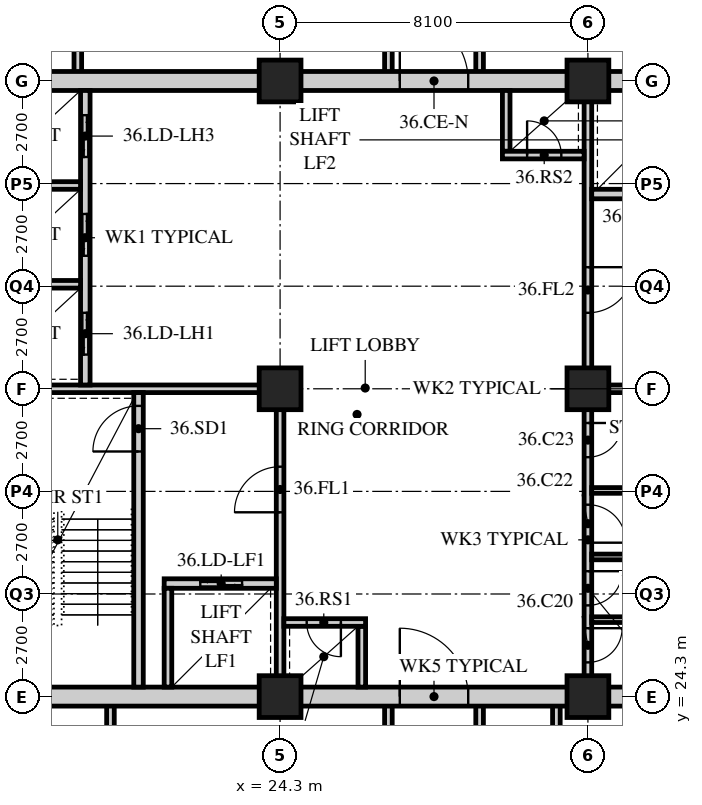
"""IFC4 building model, lengths in metres.
Left out: names, types, materials, properties, quantities, classifications, styles, units other than length and angle.
Written with IfcOpenShell. Run it as: python <this file> out.ifc"""

import sys

from ifc_helpers import new_model, si_unit, direction, frame, frame_2d, origin, origin_2d, place, context, subcontext, project, spatial, rectangle, hollow_rectangle, extrude, element, fill, save


model = new_model("IFC4")
c1 = context("Model", 3, precision=1e-05, world=origin(), true_north=direction((0.0, 1.0)))
c2 = subcontext(c1, "Body", "Model", "MODEL_VIEW")
j1 = project(units=[si_unit("LENGTHUNIT", "METRE"), si_unit("PLANEANGLEUNIT", "RADIAN")], contexts=[c1])
p1 = place(None, origin())
s1 = spatial("IfcSite", under=j1, at=p1, CompositionType="ELEMENT")
p2 = place(p1, origin())
s2 = spatial("IfcBuilding", under=s1, at=p2, CompositionType="ELEMENT")
p3 = place(p2, frame((0.0, 0.0, 140.8)))
s3 = spatial("IfcBuildingStorey", under=s2, at=p3, CompositionType="ELEMENT", Elevation=140.8)
for number, where, z_axis, x_axis in (
    (1, (24.3, 24.3, 0.0), (0.0, 0.0, 1.0), (1.0, 0.0, 0.0)),
    (2, (24.3, 32.4, 0.0), (0.0, 0.0, 1.0), (1.0, 0.0, 0.0)),
    (3, (24.3, 40.5, 0.0), (0.0, 0.0, 1.0), (1.0, 0.0, 0.0)),
    (4, (32.4, 24.3, 0.0), (0.0, 0.0, 1.0), (1.0, 0.0, 0.0)),
    (5, (32.4, 32.4, 0.0), (0.0, 0.0, 1.0), (1.0, 0.0, 0.0)),
    (6, (32.4, 40.5, 0.0), (0.0, 0.0, 1.0), (1.0, 0.0, 0.0)),
):
    element("IfcColumn", number, at=place(p3, frame(where, z_axis=z_axis, x_axis=x_axis)), inside=s3, PredefinedType="COLUMN", context=c2, shape_type="SweptSolid", body=[
        extrude(hollow_rectangle(XDim=1.1, YDim=1.1, WallThickness=0.1, at=origin_2d()), origin(), (0.0, 0.0, 1.0), 3.4),
    ])
for number, where, z_axis, x_axis in (
    (7, (19.836, 19.35, 0.0), (0.0, 0.0, 1.0), (0.0, 1.0, 0.0)),
    (8, (31.57, 19.35, 0.0), (0.0, 0.0, 1.0), (0.0, 1.0, 0.0)),
    (9, (27.15, 19.35, 0.0), (0.0, 0.0, 1.0), (0.0, 1.0, 0.0)),
    (10, (29.55, 19.35, 0.0), (0.0, 0.0, 1.0), (0.0, 1.0, 0.0)),
):
    element("IfcWall", number, at=place(p3, frame(where, z_axis=z_axis, x_axis=x_axis)), inside=s3, PredefinedType="SOLIDWALL", context=c2, shape_type="SweptSolid", body=[
        extrude(rectangle(XDim=4.95, YDim=0.2, at=frame_2d((2.475, 0.0))), origin(), (0.0, 0.0, 1.0), 3.19),
    ])
for number, where, z_axis, x_axis in (
    (11, (18.978, 44.1, 0.0), (0.0, 0.0, 1.0), (0.0, -1.0, 0.0)),
    (12, (27.15, 40.5, 0.0), (0.0, 0.0, 1.0), (0.0, 1.0, 0.0)),
    (13, (29.55, 40.5, 0.0), (0.0, 0.0, 1.0), (0.0, 1.0, 0.0)),
):
    element("IfcWall", number, at=place(p3, frame(where, z_axis=z_axis, x_axis=x_axis)), inside=s3, PredefinedType="SOLIDWALL", context=c2, shape_type="SweptSolid", body=[
        extrude(rectangle(XDim=3.6, YDim=0.2, at=frame_2d((1.8, 0.0))), origin(), (0.0, 0.0, 1.0), 3.19),
    ])
p4 = place(p3, frame((15.95, 24.3, 0.0), z_axis=(0.0, 0.0, 1.0), x_axis=(1.0, 0.0, 0.0)))
e14 = element("IfcWall", 14, at=p4, inside=s3, PredefinedType="SOLIDWALL", context=c2, shape_type="SweptSolid", body=[
    extrude(rectangle(XDim=24.8, YDim=0.5, at=frame_2d((12.4, 0.0))), origin(), (0.0, 0.0, 1.0), 2.54),
])
p5 = place(p4, frame((11.5, 0.0, 0.0)))
e15 = element("IfcOpeningElement", 15, at=p5, cuts=e14, PredefinedType="OPENING", context=c2, shape_type="SweptSolid", body=[
    extrude(rectangle(XDim=1.8, YDim=2.4, at=frame_2d((0.9, 1.2))), frame((0.0, 0.26, 0.0), z_axis=(0.0, -1.0, 0.0), x_axis=(1.0, 0.0, 0.0)), (0.0, 0.0, 1.0), 0.52),
])
p6 = place(p3, frame((15.95, 40.5, 0.0), z_axis=(0.0, 0.0, 1.0), x_axis=(1.0, 0.0, 0.0)))
e16 = element("IfcWall", 16, at=p6, inside=s3, PredefinedType="SOLIDWALL", context=c2, shape_type="SweptSolid", body=[
    extrude(rectangle(XDim=24.8, YDim=0.5, at=frame_2d((12.4, 0.0))), origin(), (0.0, 0.0, 1.0), 2.54),
])
p7 = place(p6, frame((11.5, 0.0, 0.0)))
e17 = element("IfcOpeningElement", 17, at=p7, cuts=e16, PredefinedType="OPENING", context=c2, shape_type="SweptSolid", body=[
    extrude(rectangle(XDim=1.8, YDim=2.4, at=frame_2d((0.9, 1.2))), frame((0.0, 0.26, 0.0), z_axis=(0.0, -1.0, 0.0), x_axis=(1.0, 0.0, 0.0)), (0.0, 0.0, 1.0), 0.52),
])
p8 = place(p3, frame((16.45, 32.4, 0.0), z_axis=(0.0, 0.0, 1.0), x_axis=(1.0, 0.0, 0.0)))
e18 = element("IfcWall", 18, at=p8, inside=s3, PredefinedType="SOLIDWALL", context=c2, shape_type="SweptSolid", body=[
    extrude(rectangle(XDim=7.95, YDim=0.2, at=frame_2d((3.975, 0.0))), origin(), (0.0, 0.0, 1.0), 2.578),
])
p9 = place(p3, frame((24.3, 24.55, 0.0), z_axis=(0.0, 0.0, 1.0), x_axis=(0.0, 1.0, 0.0)))
e19 = element("IfcWall", 19, at=p9, inside=s3, PredefinedType="SOLIDWALL", context=c2, shape_type="SweptSolid", body=[
    extrude(rectangle(XDim=7.75, YDim=0.2, at=frame_2d((3.875, 0.0))), origin(), (0.0, 0.0, 1.0), 2.578),
])
p10 = place(p9, frame((4.6, 0.0, 0.0)))
e20 = element("IfcOpeningElement", 20, at=p10, cuts=e19, PredefinedType="OPENING", context=c2, shape_type="SweptSolid", body=[
    extrude(rectangle(XDim=1.2, YDim=2.1, at=frame_2d((0.6, 1.05))), frame((0.0, 0.11, 0.0), z_axis=(0.0, -1.0, 0.0), x_axis=(1.0, 0.0, 0.0)), (0.0, 0.0, 1.0), 0.22),
])
p11 = place(p3, frame((20.575, 24.55, 0.0), z_axis=(0.0, 0.0, 1.0), x_axis=(0.0, 1.0, 0.0)))
e21 = element("IfcWall", 21, at=p11, inside=s3, PredefinedType="SOLIDWALL", context=c2, shape_type="SweptSolid", body=[
    extrude(rectangle(XDim=7.75, YDim=0.25, at=frame_2d((3.875, 0.0))), origin(), (0.0, 0.0, 1.0), 3.19),
])
p12 = place(p11, frame((6.2, 0.0, 0.0)))
e22 = element("IfcOpeningElement", 22, at=p12, cuts=e21, PredefinedType="OPENING", context=c2, shape_type="SweptSolid", body=[
    extrude(rectangle(XDim=1.2, YDim=2.1, at=frame_2d((0.6, 1.05))), frame((0.0, 0.135, 0.0), z_axis=(0.0, -1.0, 0.0), x_axis=(1.0, 0.0, 0.0)), (0.0, 0.0, 1.0), 0.27),
])
p13 = place(p3, frame((21.25, 27.275, 0.0), z_axis=(0.0, 0.0, 1.0), x_axis=(1.0, 0.0, 0.0)))
e23 = element("IfcWall", 23, at=p13, inside=s3, PredefinedType="SOLIDWALL", context=c2, shape_type="SweptSolid", body=[
    extrude(rectangle(XDim=2.95, YDim=0.25, at=frame_2d((1.475, 0.0))), origin(), (0.0, 0.0, 1.0), 3.19),
])
p14 = place(p13, frame((0.95, 0.0, 0.0)))
e24 = element("IfcOpeningElement", 24, at=p14, cuts=e23, PredefinedType="OPENING", context=c2, shape_type="SweptSolid", body=[
    extrude(rectangle(XDim=1.1, YDim=2.4, at=frame_2d((0.55, 1.2))), frame((0.0, 0.135, 0.0), z_axis=(0.0, -1.0, 0.0), x_axis=(1.0, 0.0, 0.0)), (0.0, 0.0, 1.0), 0.27),
])
p15 = place(p3, frame((21.35, 24.55, 0.0), z_axis=(0.0, 0.0, 1.0), x_axis=(0.0, 1.0, 0.0)))
e25 = element("IfcWall", 25, at=p15, inside=s3, PredefinedType="SOLIDWALL", context=c2, shape_type="SweptSolid", body=[
    extrude(rectangle(XDim=2.6, YDim=0.2, at=frame_2d((1.3, 0.0))), origin(), (0.0, 0.0, 1.0), 3.19),
])
p16 = place(p3, frame((19.175, 32.5, 0.0), z_axis=(0.0, 0.0, 1.0), x_axis=(0.0, 1.0, 0.0)))
e26 = element("IfcWall", 26, at=p16, inside=s3, PredefinedType="SOLIDWALL", context=c2, shape_type="SweptSolid", body=[
    extrude(rectangle(XDim=7.75, YDim=0.25, at=frame_2d((3.875, 0.0))), origin(), (0.0, 0.0, 1.0), 3.19),
])
p17 = place(p16, frame((0.8, 0.0, 0.0)))
e27 = element("IfcOpeningElement", 27, at=p17, cuts=e26, PredefinedType="OPENING", context=c2, shape_type="SweptSolid", body=[
    extrude(rectangle(XDim=1.1, YDim=2.4, at=frame_2d((0.55, 1.2))), frame((0.0, 0.135, 0.0), z_axis=(0.0, -1.0, 0.0), x_axis=(1.0, 0.0, 0.0)), (0.0, 0.0, 1.0), 0.27),
])
p18 = place(p16, frame((3.4, 0.0, 0.0)))
e28 = element("IfcOpeningElement", 28, at=p18, cuts=e26, PredefinedType="OPENING", context=c2, shape_type="SweptSolid", body=[
    extrude(rectangle(XDim=1.1, YDim=2.4, at=frame_2d((0.55, 1.2))), frame((0.0, 0.135, 0.0), z_axis=(0.0, -1.0, 0.0), x_axis=(1.0, 0.0, 0.0)), (0.0, 0.0, 1.0), 0.27),
])
p19 = place(p16, frame((6.0, 0.0, 0.0)))
e29 = element("IfcOpeningElement", 29, at=p19, cuts=e26, PredefinedType="OPENING", context=c2, shape_type="SweptSolid", body=[
    extrude(rectangle(XDim=1.1, YDim=2.4, at=frame_2d((0.55, 1.2))), frame((0.0, 0.135, 0.0), z_axis=(0.0, -1.0, 0.0), x_axis=(1.0, 0.0, 0.0)), (0.0, 0.0, 1.0), 0.27),
])
for number, where, z_axis, x_axis in (
    (30, (16.45, 35.15, 0.0), (0.0, 0.0, 1.0), (1.0, 0.0, 0.0)),
    (31, (16.45, 37.75, 0.0), (0.0, 0.0, 1.0), (1.0, 0.0, 0.0)),
):
    element("IfcWall", number, at=place(p3, frame(where, z_axis=z_axis, x_axis=x_axis)), inside=s3, PredefinedType="SOLIDWALL", context=c2, shape_type="SweptSolid", body=[
        extrude(rectangle(XDim=2.6, YDim=0.2, at=frame_2d((1.3, 0.0))), origin(), (0.0, 0.0, 1.0), 3.19),
    ])
p20 = place(p3, frame((26.45, 24.55, 0.0), z_axis=(0.0, 0.0, 1.0), x_axis=(0.0, 1.0, 0.0)))
e32 = element("IfcWall", 32, at=p20, inside=s3, PredefinedType="SOLIDWALL", context=c2, shape_type="SweptSolid", body=[
    extrude(rectangle(XDim=1.6, YDim=0.2, at=frame_2d((0.8, 0.0))), origin(), (0.0, 0.0, 1.0), 3.19),
])
p21 = place(p3, frame((24.4, 26.25, 0.0), z_axis=(0.0, 0.0, 1.0), x_axis=(1.0, 0.0, 0.0)))
e33 = element("IfcWall", 33, at=p21, inside=s3, PredefinedType="SOLIDWALL", context=c2, shape_type="SweptSolid", body=[
    extrude(rectangle(XDim=2.15, YDim=0.2, at=frame_2d((1.075, 0.0))), origin(), (0.0, 0.0, 1.0), 3.19),
])
p22 = place(p21, frame((0.6, 0.0, 0.0)))
e34 = element("IfcOpeningElement", 34, at=p22, cuts=e33, PredefinedType="OPENING", context=c2, shape_type="SweptSolid", body=[
    extrude(rectangle(XDim=0.9, YDim=2.1, at=frame_2d((0.45, 1.05))), frame((0.0, 0.11, 0.0), z_axis=(0.0, -1.0, 0.0), x_axis=(1.0, 0.0, 0.0)), (0.0, 0.0, 1.0), 0.22),
])
p23 = place(p3, frame((32.3, 32.4, 0.0), z_axis=(0.0, 0.0, 1.0), x_axis=(1.0, 0.0, 0.0)))
e35 = element("IfcWall", 35, at=p23, inside=s3, PredefinedType="SOLIDWALL", context=c2, shape_type="SweptSolid", body=[
    extrude(rectangle(XDim=7.95, YDim=0.2, at=frame_2d((3.975, 0.0))), origin(), (0.0, 0.0, 1.0), 2.578),
])
p24 = place(p3, frame((32.4, 32.5, 0.0), z_axis=(0.0, 0.0, 1.0), x_axis=(0.0, 1.0, 0.0)))
e36 = element("IfcWall", 36, at=p24, inside=s3, PredefinedType="SOLIDWALL", context=c2, shape_type="SweptSolid", body=[
    extrude(rectangle(XDim=7.75, YDim=0.2, at=frame_2d((3.875, 0.0))), origin(), (0.0, 0.0, 1.0), 2.578),
])
p25 = place(p24, frame((1.9, 0.0, 0.0)))
e37 = element("IfcOpeningElement", 37, at=p25, cuts=e36, PredefinedType="OPENING", context=c2, shape_type="SweptSolid", body=[
    extrude(rectangle(XDim=1.2, YDim=2.1, at=frame_2d((0.6, 1.05))), frame((0.0, 0.11, 0.0), z_axis=(0.0, -1.0, 0.0), x_axis=(1.0, 0.0, 0.0)), (0.0, 0.0, 1.0), 0.22),
])
p26 = place(p3, frame((32.5, 37.525, 0.0), z_axis=(0.0, 0.0, 1.0), x_axis=(1.0, 0.0, 0.0)))
e38 = element("IfcWall", 38, at=p26, inside=s3, PredefinedType="SOLIDWALL", context=c2, shape_type="SweptSolid", body=[
    extrude(rectangle(XDim=2.95, YDim=0.25, at=frame_2d((1.475, 0.0))), origin(), (0.0, 0.0, 1.0), 3.19),
])
p27 = place(p26, frame((0.9, 0.0, 0.0)))
e39 = element("IfcOpeningElement", 39, at=p27, cuts=e38, PredefinedType="OPENING", context=c2, shape_type="SweptSolid", body=[
    extrude(rectangle(XDim=1.1, YDim=2.4, at=frame_2d((0.55, 1.2))), frame((0.0, 0.135, 0.0), z_axis=(0.0, -1.0, 0.0), x_axis=(1.0, 0.0, 0.0)), (0.0, 0.0, 1.0), 0.27),
])
p28 = place(p3, frame((30.25, 38.65, 0.0), z_axis=(0.0, 0.0, 1.0), x_axis=(0.0, 1.0, 0.0)))
e40 = element("IfcWall", 40, at=p28, inside=s3, PredefinedType="SOLIDWALL", context=c2, shape_type="SweptSolid", body=[
    extrude(rectangle(XDim=1.6, YDim=0.2, at=frame_2d((0.8, 0.0))), origin(), (0.0, 0.0, 1.0), 3.19),
])
p29 = place(p3, frame((30.15, 38.55, 0.0), z_axis=(0.0, 0.0, 1.0), x_axis=(1.0, 0.0, 0.0)))
e41 = element("IfcWall", 41, at=p29, inside=s3, PredefinedType="SOLIDWALL", context=c2, shape_type="SweptSolid", body=[
    extrude(rectangle(XDim=2.15, YDim=0.2, at=frame_2d((1.075, 0.0))), origin(), (0.0, 0.0, 1.0), 3.19),
])
p30 = place(p29, frame((0.65, 0.0, 0.0)))
e42 = element("IfcOpeningElement", 42, at=p30, cuts=e41, PredefinedType="OPENING", context=c2, shape_type="SweptSolid", body=[
    extrude(rectangle(XDim=0.9, YDim=2.1, at=frame_2d((0.45, 1.05))), frame((0.0, 0.11, 0.0), z_axis=(0.0, -1.0, 0.0), x_axis=(1.0, 0.0, 0.0)), (0.0, 0.0, 1.0), 0.22),
])
p31 = place(p3, frame((32.4, 24.55, 0.0), z_axis=(0.0, 0.0, 1.0), x_axis=(0.0, 1.0, 0.0)))
e43 = element("IfcWall", 43, at=p31, inside=s3, PredefinedType="PARTITIONING", context=c2, shape_type="SweptSolid", body=[
    extrude(rectangle(XDim=7.75, YDim=0.2, at=frame_2d((3.875, 0.0))), origin(), (0.0, 0.0, 1.0), 2.578),
])
p32 = place(p31, frame((0.65, 0.0, 0.0)))
e44 = element("IfcOpeningElement", 44, at=p32, cuts=e43, PredefinedType="OPENING", context=c2, shape_type="SweptSolid", body=[
    extrude(rectangle(XDim=0.9, YDim=2.1, at=frame_2d((0.45, 1.05))), frame((0.0, 0.11, 0.0), z_axis=(0.0, -1.0, 0.0), x_axis=(1.0, 0.0, 0.0)), (0.0, 0.0, 1.0), 0.22),
])
p33 = place(p31, frame((2.15, 0.0, 0.0)))
e45 = element("IfcOpeningElement", 45, at=p33, cuts=e43, PredefinedType="OPENING", context=c2, shape_type="SweptSolid", body=[
    extrude(rectangle(XDim=0.9, YDim=2.1, at=frame_2d((0.45, 1.05))), frame((0.0, 0.11, 0.0), z_axis=(0.0, -1.0, 0.0), x_axis=(1.0, 0.0, 0.0)), (0.0, 0.0, 1.0), 0.22),
])
p34 = place(p31, frame((3.8, 0.0, 0.0)))
e46 = element("IfcOpeningElement", 46, at=p34, cuts=e43, PredefinedType="OPENING", context=c2, shape_type="SweptSolid", body=[
    extrude(rectangle(XDim=1.0, YDim=2.1, at=frame_2d((0.5, 1.05))), frame((0.0, 0.11, 0.0), z_axis=(0.0, -1.0, 0.0), x_axis=(1.0, 0.0, 0.0)), (0.0, 0.0, 1.0), 0.22),
])
p35 = place(p31, frame((6.05, 0.0, 0.0)))
e47 = element("IfcOpeningElement", 47, at=p35, cuts=e43, PredefinedType="OPENING", context=c2, shape_type="SweptSolid", body=[
    extrude(rectangle(XDim=0.9, YDim=2.1, at=frame_2d((0.45, 1.05))), frame((0.0, 0.11, 0.0), z_axis=(0.0, -1.0, 0.0), x_axis=(1.0, 0.0, 0.0)), (0.0, 0.0, 1.0), 0.22),
])
for number, where, z_axis, x_axis in (
    (48, (32.5, 26.325, 0.0), (0.0, 0.0, 1.0), (1.0, 0.0, 0.0)),
    (49, (32.5, 27.975, 0.0), (0.0, 0.0, 1.0), (1.0, 0.0, 0.0)),
):
    element("IfcWall", number, at=place(p3, frame(where, z_axis=z_axis, x_axis=x_axis)), inside=s3, PredefinedType="PARTITIONING", context=c2, shape_type="SweptSolid", body=[
        extrude(rectangle(XDim=2.55, YDim=0.15, at=frame_2d((1.275, 0.0))), origin(), (0.0, 0.0, 1.0), 3.19),
    ])
p36 = place(p3, frame((32.5, 29.725, 0.0), z_axis=(0.0, 0.0, 1.0), x_axis=(1.0, 0.0, 0.0)))
e50 = element("IfcWall", 50, at=p36, inside=s3, PredefinedType="PARTITIONING", context=c2, shape_type="SweptSolid", body=[
    extrude(rectangle(XDim=2.4, YDim=0.15, at=frame_2d((1.2, 0.0))), origin(), (0.0, 0.0, 1.0), 3.19),
])
p37 = place(p32, origin())
e51 = element("IfcDoor", 51, at=p37, inside=s3, OperationType="SINGLE_SWING_LEFT", PredefinedType="DOOR", context=c2, shape_type="SweptSolid", body=[
    extrude(rectangle(XDim=0.9, YDim=2.1, at=frame_2d((0.45, 1.05))), frame((0.0, 0.025, 0.0), z_axis=(0.0, -1.0, 0.0), x_axis=(1.0, 0.0, 0.0)), (0.0, 0.0, 1.0), 0.05),
])
fill(e44, e51)
p38 = place(p33, origin())
e52 = element("IfcDoor", 52, at=p38, inside=s3, OperationType="SINGLE_SWING_LEFT", PredefinedType="DOOR", context=c2, shape_type="SweptSolid", body=[
    extrude(rectangle(XDim=0.9, YDim=2.1, at=frame_2d((0.45, 1.05))), frame((0.0, 0.025, 0.0), z_axis=(0.0, -1.0, 0.0), x_axis=(1.0, 0.0, 0.0)), (0.0, 0.0, 1.0), 0.05),
])
fill(e45, e52)
p39 = place(p34, origin())
e53 = element("IfcDoor", 53, at=p39, inside=s3, OperationType="SINGLE_SWING_RIGHT", PredefinedType="DOOR", context=c2, shape_type="SweptSolid", body=[
    extrude(rectangle(XDim=1.0, YDim=2.1, at=frame_2d((0.5, 1.05))), frame((0.0, 0.025, 0.0), z_axis=(0.0, -1.0, 0.0), x_axis=(1.0, 0.0, 0.0)), (0.0, 0.0, 1.0), 0.05),
])
fill(e46, e53)
p40 = place(p35, origin())
e54 = element("IfcDoor", 54, at=p40, inside=s3, OperationType="SINGLE_SWING_LEFT", PredefinedType="DOOR", context=c2, shape_type="SweptSolid", body=[
    extrude(rectangle(XDim=0.9, YDim=2.1, at=frame_2d((0.45, 1.05))), frame((0.0, 0.025, 0.0), z_axis=(0.0, -1.0, 0.0), x_axis=(1.0, 0.0, 0.0)), (0.0, 0.0, 1.0), 0.05),
])
fill(e47, e54)
p41 = place(p12, origin())
e55 = element("IfcDoor", 55, at=p41, inside=s3, OperationType="SINGLE_SWING_LEFT", PredefinedType="DOOR", context=c2, shape_type="SweptSolid", body=[
    extrude(rectangle(XDim=1.2, YDim=2.1, at=frame_2d((0.6, 1.05))), frame((0.0, 0.025, 0.0), z_axis=(0.0, -1.0, 0.0), x_axis=(1.0, 0.0, 0.0)), (0.0, 0.0, 1.0), 0.05),
])
fill(e22, e55)
p42 = place(p10, origin())
e56 = element("IfcDoor", 56, at=p42, inside=s3, OperationType="SINGLE_SWING_LEFT", PredefinedType="DOOR", context=c2, shape_type="SweptSolid", body=[
    extrude(rectangle(XDim=1.2, YDim=2.1, at=frame_2d((0.6, 1.05))), frame((0.0, 0.025, 0.0), z_axis=(0.0, -1.0, 0.0), x_axis=(1.0, 0.0, 0.0)), (0.0, 0.0, 1.0), 0.05),
])
fill(e20, e56)
p43 = place(p22, origin())
e57 = element("IfcDoor", 57, at=p43, inside=s3, OperationType="SINGLE_SWING_LEFT", PredefinedType="DOOR", context=c2, shape_type="SweptSolid", body=[
    extrude(rectangle(XDim=0.9, YDim=2.1, at=frame_2d((0.45, 1.05))), frame((0.0, 0.025, 0.0), z_axis=(0.0, -1.0, 0.0), x_axis=(1.0, 0.0, 0.0)), (0.0, 0.0, 1.0), 0.05),
])
fill(e34, e57)
p44 = place(p25, origin())
e58 = element("IfcDoor", 58, at=p44, inside=s3, OperationType="SINGLE_SWING_LEFT", PredefinedType="DOOR", context=c2, shape_type="SweptSolid", body=[
    extrude(rectangle(XDim=1.2, YDim=2.1, at=frame_2d((0.6, 1.05))), frame((0.0, 0.025, 0.0), z_axis=(0.0, -1.0, 0.0), x_axis=(1.0, 0.0, 0.0)), (0.0, 0.0, 1.0), 0.05),
])
fill(e37, e58)
p45 = place(p30, origin())
e59 = element("IfcDoor", 59, at=p45, inside=s3, OperationType="SINGLE_SWING_LEFT", PredefinedType="DOOR", context=c2, shape_type="SweptSolid", body=[
    extrude(rectangle(XDim=0.9, YDim=2.1, at=frame_2d((0.45, 1.05))), frame((0.0, 0.025, 0.0), z_axis=(0.0, -1.0, 0.0), x_axis=(1.0, 0.0, 0.0)), (0.0, 0.0, 1.0), 0.05),
])
fill(e42, e59)
p46 = place(p17, origin())
e60 = element("IfcDoor", 60, at=p46, inside=s3, OperationType="DOUBLE_DOOR_SLIDING", PredefinedType="DOOR", context=c2, shape_type="SweptSolid", body=[
    extrude(rectangle(XDim=1.1, YDim=2.4, at=frame_2d((0.55, 1.2))), frame((0.0, 0.025, 0.0), z_axis=(0.0, -1.0, 0.0), x_axis=(1.0, 0.0, 0.0)), (0.0, 0.0, 1.0), 0.05),
])
fill(e27, e60)
p47 = place(p18, origin())
e61 = element("IfcDoor", 61, at=p47, inside=s3, OperationType="DOUBLE_DOOR_SLIDING", PredefinedType="DOOR", context=c2, shape_type="SweptSolid", body=[
    extrude(rectangle(XDim=1.1, YDim=2.4, at=frame_2d((0.55, 1.2))), frame((0.0, 0.025, 0.0), z_axis=(0.0, -1.0, 0.0), x_axis=(1.0, 0.0, 0.0)), (0.0, 0.0, 1.0), 0.05),
])
fill(e28, e61)
p48 = place(p19, origin())
e62 = element("IfcDoor", 62, at=p48, inside=s3, OperationType="DOUBLE_DOOR_SLIDING", PredefinedType="DOOR", context=c2, shape_type="SweptSolid", body=[
    extrude(rectangle(XDim=1.1, YDim=2.4, at=frame_2d((0.55, 1.2))), frame((0.0, 0.025, 0.0), z_axis=(0.0, -1.0, 0.0), x_axis=(1.0, 0.0, 0.0)), (0.0, 0.0, 1.0), 0.05),
])
fill(e29, e62)
p49 = place(p14, origin())
e63 = element("IfcDoor", 63, at=p49, inside=s3, OperationType="DOUBLE_DOOR_SLIDING", PredefinedType="DOOR", context=c2, shape_type="SweptSolid", body=[
    extrude(rectangle(XDim=1.1, YDim=2.4, at=frame_2d((0.55, 1.2))), frame((0.0, 0.025, 0.0), z_axis=(0.0, -1.0, 0.0), x_axis=(1.0, 0.0, 0.0)), (0.0, 0.0, 1.0), 0.05),
])
fill(e24, e63)
p50 = place(p5, origin())
e64 = element("IfcDoor", 64, at=p50, inside=s3, OperationType="DOUBLE_DOOR_SINGLE_SWING", PredefinedType="DOOR", context=c2, shape_type="SweptSolid", body=[
    extrude(rectangle(XDim=1.8, YDim=2.4, at=frame_2d((0.9, 1.2))), frame((0.0, 0.025, 0.0), z_axis=(0.0, -1.0, 0.0), x_axis=(1.0, 0.0, 0.0)), (0.0, 0.0, 1.0), 0.05),
])
fill(e15, e64)
p51 = place(p7, origin())
e65 = element("IfcDoor", 65, at=p51, inside=s3, OperationType="DOUBLE_DOOR_SINGLE_SWING", PredefinedType="DOOR", context=c2, shape_type="SweptSolid", body=[
    extrude(rectangle(XDim=1.8, YDim=2.4, at=frame_2d((0.9, 1.2))), frame((0.0, 0.025, 0.0), z_axis=(0.0, -1.0, 0.0), x_axis=(1.0, 0.0, 0.0)), (0.0, 0.0, 1.0), 0.05),
])
fill(e17, e65)
save(model, sys.argv[1])
